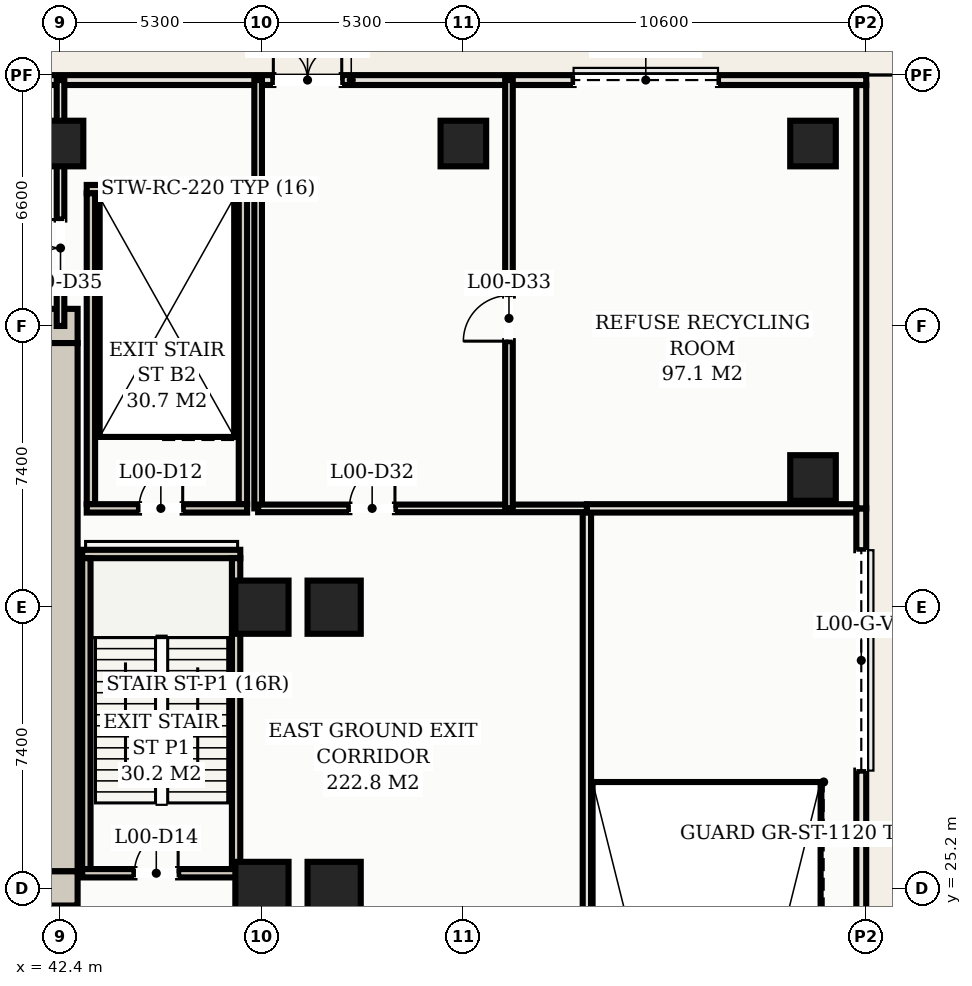
"""IFC4 building model, lengths in metres.
Left out: names, types, materials, properties, quantities, classifications, styles, units other than length and angle.
Written with IfcOpenShell. Run it as: python <this file> out.ifc"""

import sys

from ifc_helpers import new_model, si_unit, direction, frame, frame_2d, origin, origin_2d, place, context, subcontext, project, spatial, rectangle, hollow_rectangle, extrude, element, fill, save


model = new_model("IFC4")
c1 = context("Model", 3, precision=1e-05, world=origin(), true_north=direction((0.0, 1.0)))
c2 = subcontext(c1, "Body", "Model", "MODEL_VIEW")
j1 = project(units=[si_unit("LENGTHUNIT", "METRE"), si_unit("PLANEANGLEUNIT", "RADIAN")], contexts=[c1])
p1 = place(None, origin())
s1 = spatial("IfcSite", under=j1, at=p1, CompositionType="ELEMENT")
p2 = place(p1, origin())
s2 = spatial("IfcBuilding", under=s1, at=p2, CompositionType="ELEMENT")
p3 = place(p2, origin())
s3 = spatial("IfcBuildingStorey", under=s2, at=p3, CompositionType="ELEMENT", Elevation=0.0)
p4 = place(p3, frame((10.15, 40.0, 0.0), z_axis=(0.0, 0.0, 1.0), x_axis=(1.0, 0.0, 0.0)))
e1 = element("IfcWall", 1, at=p4, inside=s3, PredefinedType="SHEAR", context=c2, shape_type="SweptSolid", body=[
    extrude(rectangle(XDim=32.7, YDim=0.9, at=frame_2d((16.35, 0.0))), origin(), (0.0, 0.0, 1.0), 4.95),
])
p5 = place(p3, frame((42.4, 25.65, 0.0), z_axis=(0.0, 0.0, 1.0), x_axis=(0.0, 1.0, 0.0)))
e2 = element("IfcWall", 2, at=p5, inside=s3, PredefinedType="SHEAR", context=c2, shape_type="SweptSolid", body=[
    extrude(rectangle(XDim=13.9, YDim=0.9, at=frame_2d((6.95, 0.0))), origin(), (0.0, 0.0, 1.0), 4.95),
])
p6 = place(p3, frame((34.6, 25.2, 0.0), z_axis=(0.0, 0.0, 1.0), x_axis=(1.0, 0.0, 0.0)))
e3 = element("IfcWall", 3, at=p6, inside=s3, PredefinedType="SHEAR", context=c2, shape_type="SweptSolid", body=[
    extrude(rectangle(XDim=8.25, YDim=0.9, at=frame_2d((4.125, 0.0))), origin(), (0.0, 0.0, 1.0), 4.95),
])
p7 = place(p6, frame((0.65, 0.0, 0.0)))
e4 = element("IfcOpeningElement", 4, at=p7, cuts=e3, PredefinedType="OPENING", context=c2, shape_type="SweptSolid", body=[
    extrude(rectangle(XDim=1.25, YDim=2.2, at=frame_2d((0.625, 1.1))), frame((0.0, 0.46, 0.0), z_axis=(0.0, -1.0, 0.0), x_axis=(1.0, 0.0, 0.0)), (0.0, 0.0, 1.0), 0.92),
])
for number, where, z_axis, x_axis in (
    (5, (47.7, 25.2, 0.0), (0.0, 0.0, 1.0), (1.0, 0.0, 0.0)),
    (6, (47.7, 32.6, 0.0), (0.0, 0.0, 1.0), (1.0, 0.0, 0.0)),
    (7, (49.6, 25.2, 0.0), (0.0, 0.0, 1.0), (1.0, 0.0, 0.0)),
    (8, (49.6, 32.6, 0.0), (0.0, 0.0, 1.0), (1.0, 0.0, 0.0)),
):
    element("IfcColumn", number, at=place(p3, frame(where, z_axis=z_axis, x_axis=x_axis)), inside=s3, PredefinedType="COLUMN", context=c2, shape_type="SweptSolid", body=[
        extrude(hollow_rectangle(XDim=1.4, YDim=1.4, WallThickness=0.045, at=origin_2d()), origin(), (0.0, 0.0, 1.0), 5.2),
    ])
for number, where, z_axis, x_axis in (
    (9, (42.4, 44.8, 0.0), (0.0, 0.0, 1.0), (1.0, 0.0, 0.0)),
    (10, (53.0, 44.8, 0.0), (0.0, 0.0, 1.0), (1.0, 0.0, 0.0)),
):
    element("IfcColumn", number, at=place(p3, frame(where, z_axis=z_axis, x_axis=x_axis)), inside=s3, PredefinedType="COLUMN", context=c2, shape_type="SweptSolid", body=[
        extrude(hollow_rectangle(XDim=1.2, YDim=1.2, WallThickness=0.04, at=origin_2d()), origin(), (0.0, 0.0, 1.0), 5.2),
    ])
for number, where, z_axis, x_axis in (
    (11, (62.2, 44.8, 0.0), (0.0, 0.0, 1.0), (1.0, 0.0, 0.0)),
    (12, (62.2, 36.0, 0.0), (0.0, 0.0, 1.0), (1.0, 0.0, 0.0)),
):
    element("IfcColumn", number, at=place(p3, frame(where, z_axis=z_axis, x_axis=x_axis)), inside=s3, PredefinedType="COLUMN", context=c2, shape_type="SweptSolid", body=[
        extrude(hollow_rectangle(XDim=1.2, YDim=1.2, WallThickness=0.04, at=origin_2d()), origin(), (0.0, 0.0, 1.0), 5.164),
    ])
p8 = place(p3, frame((42.97, 34.0, 0.0), z_axis=(0.0, 0.0, 1.0), x_axis=(1.0, 0.0, 0.0)))
e13 = element("IfcWall", 13, at=p8, inside=s3, PredefinedType="SHEAR", context=c2, shape_type="SweptSolid", body=[
    extrude(rectangle(XDim=4.16, YDim=0.22, at=frame_2d((2.08, 0.0))), origin(), (0.0, 0.0, 1.0), 4.95),
])
for number, where, z_axis, x_axis in (
    (14, (43.08, 25.71, 0.0), (0.0, 0.0, 1.0), (0.0, 1.0, 0.0)),
    (15, (47.02, 25.71, 0.0), (0.0, 0.0, 1.0), (0.0, 1.0, 0.0)),
):
    element("IfcWall", number, at=place(p3, frame(where, z_axis=z_axis, x_axis=x_axis)), inside=s3, PredefinedType="SHEAR", context=c2, shape_type="SweptSolid", body=[
        extrude(rectangle(XDim=8.18, YDim=0.22, at=frame_2d((4.09, 0.0))), origin(), (0.0, 0.0, 1.0), 4.95),
    ])
p9 = place(p3, frame((42.97, 25.6, 0.0), z_axis=(0.0, 0.0, 1.0), x_axis=(1.0, 0.0, 0.0)))
e16 = element("IfcWall", 16, at=p9, inside=s3, PredefinedType="SHEAR", context=c2, shape_type="SweptSolid", body=[
    extrude(rectangle(XDim=4.16, YDim=0.22, at=frame_2d((2.08, 0.0))), origin(), (0.0, 0.0, 1.0), 4.95),
])
p10 = place(p9, frame((1.375, 0.0, 0.0)))
e17 = element("IfcOpeningElement", 17, at=p10, cuts=e16, PredefinedType="OPENING", context=c2, shape_type="SweptSolid", body=[
    extrude(rectangle(XDim=1.15, YDim=2.2, at=frame_2d((0.575, 1.1))), frame((0.0, 0.12, 0.0), z_axis=(0.0, -1.0, 0.0), x_axis=(1.0, 0.0, 0.0)), (0.0, 0.0, 1.0), 0.24),
])
p11 = place(p3, frame((43.09, 43.6, 0.0), z_axis=(0.0, 0.0, 1.0), x_axis=(1.0, 0.0, 0.0)))
e18 = element("IfcWall", 18, at=p11, inside=s3, PredefinedType="SHEAR", context=c2, shape_type="SweptSolid", body=[
    extrude(rectangle(XDim=4.22, YDim=0.22, at=frame_2d((2.11, 0.0))), origin(), (0.0, 0.0, 1.0), 4.95),
])
for number, where, z_axis, x_axis in (
    (19, (43.2, 35.31, 0.0), (0.0, 0.0, 1.0), (0.0, 1.0, 0.0)),
    (20, (47.2, 35.31, 0.0), (0.0, 0.0, 1.0), (0.0, 1.0, 0.0)),
):
    element("IfcWall", number, at=place(p3, frame(where, z_axis=z_axis, x_axis=x_axis)), inside=s3, PredefinedType="SHEAR", context=c2, shape_type="SweptSolid", body=[
        extrude(rectangle(XDim=8.18, YDim=0.22, at=frame_2d((4.09, 0.0))), origin(), (0.0, 0.0, 1.0), 4.95),
    ])
p12 = place(p3, frame((43.09, 35.2, 0.0), z_axis=(0.0, 0.0, 1.0), x_axis=(1.0, 0.0, 0.0)))
e21 = element("IfcWall", 21, at=p12, inside=s3, PredefinedType="SHEAR", context=c2, shape_type="SweptSolid", body=[
    extrude(rectangle(XDim=4.22, YDim=0.22, at=frame_2d((2.11, 0.0))), origin(), (0.0, 0.0, 1.0), 4.95),
])
p13 = place(p12, frame((1.375, 0.0, 0.0)))
e22 = element("IfcOpeningElement", 22, at=p13, cuts=e21, PredefinedType="OPENING", context=c2, shape_type="SweptSolid", body=[
    extrude(rectangle(XDim=1.15, YDim=2.2, at=frame_2d((0.575, 1.1))), frame((0.0, 0.12, 0.0), z_axis=(0.0, -1.0, 0.0), x_axis=(1.0, 0.0, 0.0)), (0.0, 0.0, 1.0), 0.24),
])
p14 = place(p3, frame((56.25, 3.85, 0.0), z_axis=(0.0, 0.0, 1.0), x_axis=(0.0, 1.0, 0.0)))
e23 = element("IfcWall", 23, at=p14, inside=s3, PredefinedType="SOLIDWALL", context=c2, shape_type="SweptSolid", body=[
    extrude(rectangle(XDim=31.35, YDim=0.22, at=frame_2d((15.675, 0.0))), origin(), (0.0, 0.0, 1.0), 4.95),
])
p15 = place(p3, frame((56.25, 35.2, 0.0), z_axis=(0.0, 0.0, 1.0), x_axis=(1.0, 0.0, 0.0)))
e24 = element("IfcWall", 24, at=p15, inside=s3, PredefinedType="SOLIDWALL", context=c2, shape_type="SweptSolid", body=[
    extrude(rectangle(XDim=7.23, YDim=0.22, at=frame_2d((3.615, 0.0))), origin(), (0.0, 0.0, 1.0), 4.95),
])
p16 = place(p3, frame((63.47, 3.85, 0.0), z_axis=(0.0, 0.0, 1.0), x_axis=(0.0, 1.0, 0.0)))
e25 = element("IfcWall", 25, at=p16, inside=s3, PredefinedType="SOLIDWALL", context=c2, shape_type="SweptSolid", body=[
    extrude(rectangle(XDim=31.35, YDim=0.26, at=frame_2d((15.675, 0.0))), origin(), (0.0, 0.0, 1.0), 4.95),
])
p17 = place(p16, frame((24.45, 0.0, 0.0)))
e26 = element("IfcOpeningElement", 26, at=p17, cuts=e25, PredefinedType="OPENING", context=c2, shape_type="SweptSolid", body=[
    extrude(rectangle(XDim=5.8, YDim=3.1, at=frame_2d((2.9, 1.55))), frame((0.0, 0.14, 0.0), z_axis=(0.0, -1.0, 0.0), x_axis=(1.0, 0.0, 0.0)), (0.0, 0.0, 1.0), 0.28),
])
p18 = place(p3, frame((63.47, 35.2, 0.0), z_axis=(0.0, 0.0, 1.0), x_axis=(0.0, 1.0, 0.0)))
e27 = element("IfcWall", 27, at=p18, inside=s3, PredefinedType="SOLIDWALL", context=c2, shape_type="SweptSolid", body=[
    extrude(rectangle(XDim=11.14, YDim=0.26, at=frame_2d((5.57, 0.0))), origin(), (0.0, 0.0, 1.0), 4.95),
])
p19 = place(p3, frame((63.6, 46.47, 0.0), z_axis=(0.0, 0.0, 1.0), x_axis=(-1.0, 0.0, 0.0)))
e28 = element("IfcWall", 28, at=p19, inside=s3, PredefinedType="SOLIDWALL", context=c2, shape_type="SweptSolid", body=[
    extrude(rectangle(XDim=27.1, YDim=0.26, at=frame_2d((13.55, 0.0))), origin(), (0.0, 0.0, 1.0), 4.95),
])
p20 = place(p19, frame((22.8, 0.0, 0.0)))
e29 = element("IfcOpeningElement", 29, at=p20, cuts=e28, PredefinedType="OPENING", context=c2, shape_type="SweptSolid", body=[
    extrude(rectangle(XDim=1.8, YDim=2.4, at=frame_2d((0.9, 1.2))), frame((0.0, 0.14, 0.0), z_axis=(0.0, -1.0, 0.0), x_axis=(1.0, 0.0, 0.0)), (0.0, 0.0, 1.0), 0.28),
])
p21 = place(p19, frame((13.8, 0.0, 0.0)))
e30 = element("IfcOpeningElement", 30, at=p21, cuts=e28, PredefinedType="OPENING", context=c2, shape_type="SweptSolid", body=[
    extrude(rectangle(XDim=1.8, YDim=2.4, at=frame_2d((0.9, 1.2))), frame((0.0, 0.14, 0.0), z_axis=(0.0, -1.0, 0.0), x_axis=(1.0, 0.0, 0.0)), (0.0, 0.0, 1.0), 0.28),
])
p22 = place(p19, frame((3.9, 0.0, 0.0)))
e31 = element("IfcOpeningElement", 31, at=p22, cuts=e28, PredefinedType="OPENING", context=c2, shape_type="SweptSolid", body=[
    extrude(rectangle(XDim=3.8, YDim=3.6, at=frame_2d((1.9, 1.8))), frame((0.0, 0.14, 0.0), z_axis=(0.0, -1.0, 0.0), x_axis=(1.0, 0.0, 0.0)), (0.0, 0.0, 1.0), 0.28),
])
p23 = place(p3, frame((47.6, 35.2, 0.0), z_axis=(0.0, 0.0, 1.0), x_axis=(0.0, 1.0, 0.0)))
e32 = element("IfcWall", 32, at=p23, inside=s3, PredefinedType="PARTITIONING", context=c2, shape_type="SweptSolid", body=[
    extrude(rectangle(XDim=11.27, YDim=0.2, at=frame_2d((5.635, 0.0))), origin(), (0.0, 0.0, 1.0), 4.95),
])
p24 = place(p3, frame((47.6, 35.2, 0.0), z_axis=(0.0, 0.0, 1.0), x_axis=(1.0, 0.0, 0.0)))
e33 = element("IfcWall", 33, at=p24, inside=s3, PredefinedType="PARTITIONING", context=c2, shape_type="SweptSolid", body=[
    extrude(rectangle(XDim=8.65, YDim=0.2, at=frame_2d((4.325, 0.0))), origin(), (0.0, 0.0, 1.0), 4.95),
])
p25 = place(p24, frame((2.4, 0.0, 0.0)))
e34 = element("IfcOpeningElement", 34, at=p25, cuts=e33, PredefinedType="OPENING", context=c2, shape_type="SweptSolid", body=[
    extrude(rectangle(XDim=1.2, YDim=2.2, at=frame_2d((0.6, 1.1))), frame((0.0, 0.11, 0.0), z_axis=(0.0, -1.0, 0.0), x_axis=(1.0, 0.0, 0.0)), (0.0, 0.0, 1.0), 0.22),
])
p26 = place(p3, frame((54.2, 35.2, 0.0), z_axis=(0.0, 0.0, 1.0), x_axis=(0.0, 1.0, 0.0)))
e35 = element("IfcWall", 35, at=p26, inside=s3, PredefinedType="PARTITIONING", context=c2, shape_type="SweptSolid", body=[
    extrude(rectangle(XDim=11.27, YDim=0.2, at=frame_2d((5.635, 0.0))), origin(), (0.0, 0.0, 1.0), 4.95),
])
p27 = place(p26, frame((4.4, 0.0, 0.0)))
e36 = element("IfcOpeningElement", 36, at=p27, cuts=e35, PredefinedType="OPENING", context=c2, shape_type="SweptSolid", body=[
    extrude(rectangle(XDim=1.2, YDim=2.2, at=frame_2d((0.6, 1.1))), frame((0.0, 0.11, 0.0), z_axis=(0.0, -1.0, 0.0), x_axis=(1.0, 0.0, 0.0)), (0.0, 0.0, 1.0), 0.22),
])
p28 = place(p3, frame((42.4, 40.0, 0.0), z_axis=(0.0, 0.0, 1.0), x_axis=(0.0, 1.0, 0.0)))
e37 = element("IfcWall", 37, at=p28, inside=s3, PredefinedType="PARTITIONING", context=c2, shape_type="SweptSolid", body=[
    extrude(rectangle(XDim=6.47, YDim=0.2, at=frame_2d((3.235, 0.0))), origin(), (0.0, 0.0, 1.0), 4.95),
])
p29 = place(p28, frame((1.3, 0.0, 0.0)))
e38 = element("IfcOpeningElement", 38, at=p29, cuts=e37, PredefinedType="OPENING", context=c2, shape_type="SweptSolid", body=[
    extrude(rectangle(XDim=1.5, YDim=2.25, at=frame_2d((0.75, 1.125))), frame((0.0, 0.11, 0.0), z_axis=(0.0, -1.0, 0.0), x_axis=(1.0, 0.0, 0.0)), (0.0, 0.0, 1.0), 0.22),
])
p30 = place(p21, frame((1.8, 0.0, 0.0), z_axis=(0.0, 0.0, 1.0), x_axis=(-1.0, 0.0, 0.0)))
e39 = element("IfcDoor", 39, at=p30, inside=s3, OperationType="DOUBLE_DOOR_SINGLE_SWING", PredefinedType="DOOR", context=c2, shape_type="SweptSolid", body=[
    extrude(rectangle(XDim=1.8, YDim=2.4, at=frame_2d((0.9, 1.2))), frame((0.0, 0.025, 0.0), z_axis=(0.0, -1.0, 0.0), x_axis=(1.0, 0.0, 0.0)), (0.0, 0.0, 1.0), 0.05),
])
fill(e30, e39)
p31 = place(p22, frame((3.8, 0.0, 0.0), z_axis=(0.0, 0.0, 1.0), x_axis=(-1.0, 0.0, 0.0)))
e40 = element("IfcDoor", 40, at=p31, inside=s3, OperationType="ROLLINGUP", PredefinedType="GATE", context=c2, shape_type="SweptSolid", body=[
    extrude(rectangle(XDim=3.8, YDim=3.6, at=frame_2d((1.9, 1.8))), frame((0.0, 0.025, 0.0), z_axis=(0.0, -1.0, 0.0), x_axis=(1.0, 0.0, 0.0)), (0.0, 0.0, 1.0), 0.05),
])
fill(e31, e40)
p32 = place(p17, frame((5.8, 0.0, 0.0), z_axis=(0.0, 0.0, 1.0), x_axis=(-1.0, 0.0, 0.0)))
e41 = element("IfcDoor", 41, at=p32, inside=s3, OperationType="ROLLINGUP", PredefinedType="GATE", context=c2, shape_type="SweptSolid", body=[
    extrude(rectangle(XDim=5.8, YDim=3.1, at=frame_2d((2.9, 1.55))), frame((0.0, 0.025, 0.0), z_axis=(0.0, -1.0, 0.0), x_axis=(1.0, 0.0, 0.0)), (0.0, 0.0, 1.0), 0.05),
])
fill(e26, e41)
p33 = place(p13, origin())
e42 = element("IfcDoor", 42, at=p33, inside=s3, OperationType="SINGLE_SWING_RIGHT", PredefinedType="DOOR", context=c2, shape_type="SweptSolid", body=[
    extrude(rectangle(XDim=1.15, YDim=2.2, at=frame_2d((0.575, 1.1))), frame((0.0, 0.025, 0.0), z_axis=(0.0, -1.0, 0.0), x_axis=(1.0, 0.0, 0.0)), (0.0, 0.0, 1.0), 0.05),
])
fill(e22, e42)
p34 = place(p10, origin())
e43 = element("IfcDoor", 43, at=p34, inside=s3, OperationType="SINGLE_SWING_RIGHT", PredefinedType="DOOR", context=c2, shape_type="SweptSolid", body=[
    extrude(rectangle(XDim=1.15, YDim=2.2, at=frame_2d((0.575, 1.1))), frame((0.0, 0.025, 0.0), z_axis=(0.0, -1.0, 0.0), x_axis=(1.0, 0.0, 0.0)), (0.0, 0.0, 1.0), 0.05),
])
fill(e17, e43)
p35 = place(p25, origin())
e44 = element("IfcDoor", 44, at=p35, inside=s3, OperationType="SINGLE_SWING_RIGHT", PredefinedType="DOOR", context=c2, shape_type="SweptSolid", body=[
    extrude(rectangle(XDim=1.2, YDim=2.2, at=frame_2d((0.6, 1.1))), frame((0.0, 0.025, 0.0), z_axis=(0.0, -1.0, 0.0), x_axis=(1.0, 0.0, 0.0)), (0.0, 0.0, 1.0), 0.05),
])
fill(e34, e44)
p36 = place(p27, origin())
e45 = element("IfcDoor", 45, at=p36, inside=s3, OperationType="SINGLE_SWING_LEFT", PredefinedType="DOOR", context=c2, shape_type="SweptSolid", body=[
    extrude(rectangle(XDim=1.2, YDim=2.2, at=frame_2d((0.6, 1.1))), frame((0.0, 0.025, 0.0), z_axis=(0.0, -1.0, 0.0), x_axis=(1.0, 0.0, 0.0)), (0.0, 0.0, 1.0), 0.05),
])
fill(e36, e45)
p37 = place(p29, origin())
e46 = element("IfcDoor", 46, at=p37, inside=s3, OperationType="DOUBLE_DOOR_SINGLE_SWING", PredefinedType="DOOR", context=c2, shape_type="SweptSolid", body=[
    extrude(rectangle(XDim=1.5, YDim=2.25, at=frame_2d((0.75, 1.125))), frame((0.0, 0.025, 0.0), z_axis=(0.0, -1.0, 0.0), x_axis=(1.0, 0.0, 0.0)), (0.0, 0.0, 1.0), 0.05),
])
fill(e38, e46)
save(model, sys.argv[1])
